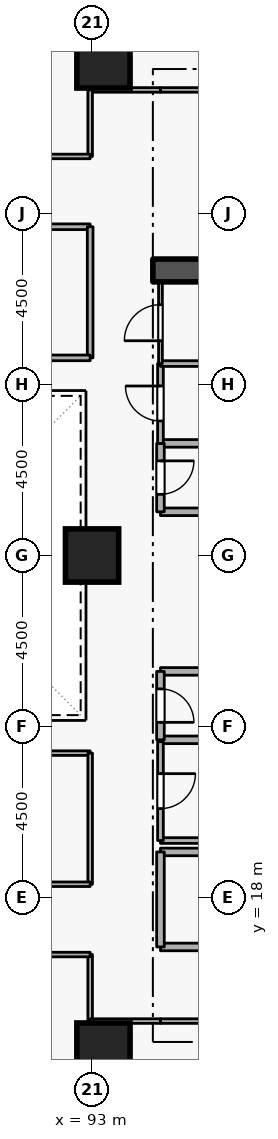
"""IFC4 building model, lengths in metres.
Left out: names, types, materials, properties, quantities, classifications, styles, units other than length and angle.
Written with IfcOpenShell. Run it as: python <this file> out.ifc"""

import sys

from ifc_helpers import new_model, si_unit, direction, frame, frame_2d, origin, origin_2d, place, context, subcontext, project, spatial, rectangle, extrude, element, fill, save


model = new_model("IFC4")
c1 = context("Model", 3, precision=1e-05, world=origin(), true_north=direction((0.0, 1.0)))
c2 = subcontext(c1, "Body", "Model", "MODEL_VIEW")
j1 = project(units=[si_unit("LENGTHUNIT", "METRE"), si_unit("PLANEANGLEUNIT", "RADIAN")], contexts=[c1])
p1 = place(None, origin())
s1 = spatial("IfcSite", under=j1, at=p1, CompositionType="ELEMENT")
p2 = place(p1, origin())
s2 = spatial("IfcBuilding", under=s1, at=p2, CompositionType="ELEMENT")
p3 = place(p2, frame((0.0, 0.0, 64.5)))
s3 = spatial("IfcBuildingStorey", under=s2, at=p3, CompositionType="ELEMENT", Elevation=64.5)
p4 = place(p3, frame((94.6, 34.5, 0.0), z_axis=(0.0, 0.0, 1.0), x_axis=(1.0, 0.0, 0.0)))
e1 = element("IfcWall", 1, at=p4, inside=s3, PredefinedType="SHEAR", context=c2, shape_type="SweptSolid", body=[
    extrude(rectangle(XDim=5.7, YDim=0.6, at=frame_2d((2.85, 0.0))), origin(), (0.0, 0.0, 1.0), 3.6),
])
for number, where, z_axis, x_axis in (
    (2, (93.3, 14.0, 0.0), (0.0, 0.0, 1.0), (1.0, 0.0, 0.0)),
    (3, (93.3, 40.0, 0.0), (0.0, 0.0, 1.0), (1.0, 0.0, 0.0)),
    (4, (93.0, 27.0, 0.0), (0.0, 0.0, 1.0), (1.0, 0.0, 0.0)),
):
    element("IfcColumn", number, at=place(p3, frame(where, z_axis=z_axis, x_axis=x_axis)), inside=s3, PredefinedType="COLUMN", context=c2, shape_type="SweptSolid", body=[
        extrude(rectangle(XDim=1.4, YDim=1.4, at=origin_2d()), origin(), (0.0, 0.0, 1.0), 3.6),
    ])
p5 = place(p3, frame((94.8, 16.7, 0.0), z_axis=(0.0, 0.0, 1.0), x_axis=(1.0, 0.0, 0.0)))
e5 = element("IfcWall", 5, at=p5, inside=s3, PredefinedType="STANDARD", context=c2, shape_type="SweptSolid", body=[
    extrude(rectangle(XDim=5.7, YDim=0.2, at=frame_2d((2.85, 0.0))), origin(), (0.0, 0.0, 1.0), 3.34),
])
p6 = place(p5, frame((2.275, 0.0, 0.0)))
e6 = element("IfcOpeningElement", 6, at=p6, cuts=e5, PredefinedType="OPENING", context=c2, shape_type="SweptSolid", body=[
    extrude(rectangle(XDim=1.15, YDim=2.1, at=frame_2d((0.575, 1.05))), frame((0.0, 0.11, 0.0), z_axis=(0.0, -1.0, 0.0), x_axis=(1.0, 0.0, 0.0)), (0.0, 0.0, 1.0), 0.22),
])
p7 = place(p3, frame((97.1, 19.2, 0.0), z_axis=(0.0, 0.0, 1.0), x_axis=(-1.0, 0.0, 0.0)))
e7 = element("IfcWall", 7, at=p7, inside=s3, PredefinedType="STANDARD", context=c2, shape_type="SweptSolid", body=[
    extrude(rectangle(XDim=2.3, YDim=0.2, at=frame_2d((1.15, 0.0))), origin(), (0.0, 0.0, 1.0), 2.545),
])
p8 = place(p3, frame((94.8, 19.2, 0.0), z_axis=(0.0, 0.0, 1.0), x_axis=(0.0, -1.0, 0.0)))
e8 = element("IfcWall", 8, at=p8, inside=s3, PredefinedType="STANDARD", context=c2, shape_type="SweptSolid", body=[
    extrude(rectangle(XDim=2.5, YDim=0.2, at=frame_2d((1.25, 0.0))), origin(), (0.0, 0.0, 1.0), 3.34),
])
for number, where, z_axis, x_axis in (
    (9, (94.8, 28.15, 0.0), (0.0, 0.0, 1.0), (1.0, 0.0, 0.0)),
    (10, (96.85, 29.95, 0.0), (0.0, 0.0, 1.0), (-1.0, 0.0, 0.0)),
):
    element("IfcWall", number, at=place(p3, frame(where, z_axis=z_axis, x_axis=x_axis)), inside=s3, PredefinedType="STANDARD", context=c2, shape_type="SweptSolid", body=[
        extrude(rectangle(XDim=2.05, YDim=0.2, at=frame_2d((1.025, 0.0))), origin(), (0.0, 0.0, 1.0), 3.34),
    ])
p9 = place(p3, frame((94.8, 29.95, 0.0), z_axis=(0.0, 0.0, 1.0), x_axis=(0.0, -1.0, 0.0)))
e11 = element("IfcWall", 11, at=p9, inside=s3, PredefinedType="STANDARD", context=c2, shape_type="SweptSolid", body=[
    extrude(rectangle(XDim=1.8, YDim=0.2, at=frame_2d((0.9, 0.0))), origin(), (0.0, 0.0, 1.0), 3.34),
])
p10 = place(p9, frame((0.46, 0.0, 0.0)))
e12 = element("IfcOpeningElement", 12, at=p10, cuts=e11, PredefinedType="OPENING", context=c2, shape_type="SweptSolid", body=[
    extrude(rectangle(XDim=0.88, YDim=2.04, at=frame_2d((0.44, 1.02))), frame((0.0, 0.11, 0.0), z_axis=(0.0, -1.0, 0.0), x_axis=(1.0, 0.0, 0.0)), (0.0, 0.0, 1.0), 0.22),
])
for number, where, z_axis, x_axis in (
    (13, (94.8, 22.15, 0.0), (0.0, 0.0, 1.0), (1.0, 0.0, 0.0)),
    (14, (96.85, 23.95, 0.0), (0.0, 0.0, 1.0), (-1.0, 0.0, 0.0)),
):
    element("IfcWall", number, at=place(p3, frame(where, z_axis=z_axis, x_axis=x_axis)), inside=s3, PredefinedType="STANDARD", context=c2, shape_type="SweptSolid", body=[
        extrude(rectangle(XDim=2.05, YDim=0.2, at=frame_2d((1.025, 0.0))), origin(), (0.0, 0.0, 1.0), 3.34),
    ])
p11 = place(p3, frame((94.8, 23.95, 0.0), z_axis=(0.0, 0.0, 1.0), x_axis=(0.0, -1.0, 0.0)))
e15 = element("IfcWall", 15, at=p11, inside=s3, PredefinedType="STANDARD", context=c2, shape_type="SweptSolid", body=[
    extrude(rectangle(XDim=1.8, YDim=0.2, at=frame_2d((0.9, 0.0))), origin(), (0.0, 0.0, 1.0), 3.34),
])
p12 = place(p11, frame((0.46, 0.0, 0.0)))
e16 = element("IfcOpeningElement", 16, at=p12, cuts=e15, PredefinedType="OPENING", context=c2, shape_type="SweptSolid", body=[
    extrude(rectangle(XDim=0.88, YDim=2.04, at=frame_2d((0.44, 1.02))), frame((0.0, 0.11, 0.0), z_axis=(0.0, -1.0, 0.0), x_axis=(1.0, 0.0, 0.0)), (0.0, 0.0, 1.0), 0.22),
])
p13 = place(p3, frame((94.8, 19.5, 0.0), z_axis=(0.0, 0.0, 1.0), x_axis=(1.0, 0.0, 0.0)))
e17 = element("IfcWall", 17, at=p13, inside=s3, PredefinedType="PARTITIONING", context=c2, shape_type="SweptSolid", body=[
    extrude(rectangle(XDim=2.05, YDim=0.15, at=frame_2d((1.025, 0.0))), origin(), (0.0, 0.0, 1.0), 2.545),
])
p14 = place(p3, frame((94.8, 22.1, 0.0), z_axis=(0.0, 0.0, 1.0), x_axis=(0.0, -1.0, 0.0)))
e18 = element("IfcWall", 18, at=p14, inside=s3, PredefinedType="PARTITIONING", context=c2, shape_type="SweptSolid", body=[
    extrude(rectangle(XDim=2.6, YDim=0.15, at=frame_2d((1.3, 0.0))), origin(), (0.0, 0.0, 1.0), 3.34),
])
p15 = place(p14, frame((0.84, 0.0, 0.0)))
e19 = element("IfcOpeningElement", 19, at=p15, cuts=e18, PredefinedType="OPENING", context=c2, shape_type="SweptSolid", body=[
    extrude(rectangle(XDim=0.92, YDim=2.08, at=frame_2d((0.46, 1.04))), frame((0.0, 0.085, 0.0), z_axis=(0.0, -1.0, 0.0), x_axis=(1.0, 0.0, 0.0)), (0.0, 0.0, 1.0), 0.17),
])
p16 = place(p3, frame((94.8, 29.95, 0.0), z_axis=(0.0, 0.0, 1.0), x_axis=(0.0, 1.0, 0.0)))
e20 = element("IfcWall", 20, at=p16, inside=s3, PredefinedType="PARTITIONING", context=c2, shape_type="SweptSolid", body=[
    extrude(rectangle(XDim=2.1, YDim=0.15, at=frame_2d((1.05, 0.0))), origin(), (0.0, 0.0, 1.0), 3.34),
])
p17 = place(p16, frame((0.59, 0.0, 0.0)))
e21 = element("IfcOpeningElement", 21, at=p17, cuts=e20, PredefinedType="OPENING", context=c2, shape_type="SweptSolid", body=[
    extrude(rectangle(XDim=0.92, YDim=2.08, at=frame_2d((0.46, 1.04))), frame((0.0, 0.085, 0.0), z_axis=(0.0, -1.0, 0.0), x_axis=(1.0, 0.0, 0.0)), (0.0, 0.0, 1.0), 0.17),
])
p18 = place(p3, frame((94.8, 32.05, 0.0), z_axis=(0.0, 0.0, 1.0), x_axis=(1.0, 0.0, 0.0)))
e22 = element("IfcWall", 22, at=p18, inside=s3, PredefinedType="PARTITIONING", context=c2, shape_type="SweptSolid", body=[
    extrude(rectangle(XDim=2.05, YDim=0.15, at=frame_2d((1.025, 0.0))), origin(), (0.0, 0.0, 1.0), 3.34),
])
p19 = place(p3, frame((94.8, 32.05, 0.0), z_axis=(0.0, 0.0, 1.0), x_axis=(0.0, 1.0, 0.0)))
e23 = element("IfcWall", 23, at=p19, inside=s3, PredefinedType="PARTITIONING", context=c2, shape_type="SweptSolid", body=[
    extrude(rectangle(XDim=2.15, YDim=0.1, at=frame_2d((1.075, 0.0))), origin(), (0.0, 0.0, 1.0), 3.34),
])
p20 = place(p19, frame((0.6, 0.0, 0.0)))
e24 = element("IfcOpeningElement", 24, at=p20, cuts=e23, PredefinedType="OPENING", context=c2, shape_type="SweptSolid", body=[
    extrude(rectangle(XDim=0.95, YDim=2.1, at=frame_2d((0.475, 1.05))), frame((0.0, 0.06, 0.0), z_axis=(0.0, -1.0, 0.0), x_axis=(1.0, 0.0, 0.0)), (0.0, 0.0, 1.0), 0.12),
])
p21 = place(p3, frame((92.95, 16.5, 0.0), z_axis=(0.0, 0.0, 1.0), x_axis=(0.0, -1.0, 0.0)))
e25 = element("IfcWall", 25, at=p21, inside=s3, PredefinedType="PARTITIONING", context=c2, shape_type="SweptSolid", body=[
    extrude(rectangle(XDim=1.75, YDim=0.12, at=frame_2d((0.875, 0.0))), origin(), (0.0, 0.0, 1.0), 3.34),
])
p22 = place(p3, frame((92.95, 14.75, 0.0), z_axis=(0.0, 0.0, 1.0), x_axis=(1.0, 0.0, 0.0)))
e26 = element("IfcWall", 26, at=p22, inside=s3, PredefinedType="PARTITIONING", context=c2, shape_type="SweptSolid", body=[
    extrude(rectangle(XDim=1.85, YDim=0.12, at=frame_2d((0.925, 0.0))), origin(), (0.0, 0.0, 1.0), 3.34),
])
p23 = place(p3, frame((94.8, 14.75, 0.0), z_axis=(0.0, 0.0, 1.0), x_axis=(1.0, 0.0, 0.0)))
e27 = element("IfcWall", 27, at=p23, inside=s3, PredefinedType="PARTITIONING", context=c2, shape_type="SweptSolid", body=[
    extrude(rectangle(XDim=9.35, YDim=0.12, at=frame_2d((4.675, 0.0))), origin(), (0.0, 0.0, 1.0), 3.34),
])
p24 = place(p23, frame((4.15, 0.0, 0.0)))
e28 = element("IfcOpeningElement", 28, at=p24, cuts=e27, PredefinedType="OPENING", context=c2, shape_type="SweptSolid", body=[
    extrude(rectangle(XDim=1.05, YDim=2.1, at=frame_2d((0.525, 1.05))), frame((0.0, 0.07, 0.0), z_axis=(0.0, -1.0, 0.0), x_axis=(1.0, 0.0, 0.0)), (0.0, 0.0, 1.0), 0.14),
])
p25 = place(p3, frame((88.5, 16.5, 0.0), z_axis=(0.0, 0.0, 1.0), x_axis=(1.0, 0.0, 0.0)))
e29 = element("IfcWall", 29, at=p25, inside=s3, PredefinedType="PARTITIONING", context=c2, shape_type="SweptSolid", body=[
    extrude(rectangle(XDim=4.45, YDim=0.12, at=frame_2d((2.225, 0.0))), origin(), (0.0, 0.0, 1.0), 3.34),
])
p26 = place(p3, frame((97.95, 39.25, 0.0), z_axis=(0.0, 0.0, 1.0), x_axis=(-1.0, 0.0, 0.0)))
e30 = element("IfcWall", 30, at=p26, inside=s3, PredefinedType="PARTITIONING", context=c2, shape_type="SweptSolid", body=[
    extrude(rectangle(XDim=3.15, YDim=0.12, at=frame_2d((1.575, 0.0))), origin(), (0.0, 0.0, 1.0), 3.34),
])
p27 = place(p3, frame((94.8, 39.25, 0.0), z_axis=(0.0, 0.0, 1.0), x_axis=(-1.0, 0.0, 0.0)))
e31 = element("IfcWall", 31, at=p27, inside=s3, PredefinedType="PARTITIONING", context=c2, shape_type="SweptSolid", body=[
    extrude(rectangle(XDim=1.85, YDim=0.12, at=frame_2d((0.925, 0.0))), origin(), (0.0, 0.0, 1.0), 3.34),
])
p28 = place(p3, frame((92.95, 39.25, 0.0), z_axis=(0.0, 0.0, 1.0), x_axis=(0.0, -1.0, 0.0)))
e32 = element("IfcWall", 32, at=p28, inside=s3, PredefinedType="PARTITIONING", context=c2, shape_type="SweptSolid", body=[
    extrude(rectangle(XDim=1.75, YDim=0.12, at=frame_2d((0.875, 0.0))), origin(), (0.0, 0.0, 1.0), 3.34),
])
p29 = place(p3, frame((92.95, 37.5, 0.0), z_axis=(0.0, 0.0, 1.0), x_axis=(-1.0, 0.0, 0.0)))
e33 = element("IfcWall", 33, at=p29, inside=s3, PredefinedType="PARTITIONING", context=c2, shape_type="SweptSolid", body=[
    extrude(rectangle(XDim=4.45, YDim=0.12, at=frame_2d((2.225, 0.0))), origin(), (0.0, 0.0, 1.0), 3.34),
])
p30 = place(p29, frame((1.7, 0.0, 0.0)))
e34 = element("IfcOpeningElement", 34, at=p30, cuts=e33, PredefinedType="OPENING", context=c2, shape_type="SweptSolid", body=[
    extrude(rectangle(XDim=1.05, YDim=2.1, at=frame_2d((0.525, 1.05))), frame((0.0, 0.07, 0.0), z_axis=(0.0, -1.0, 0.0), x_axis=(1.0, 0.0, 0.0)), (0.0, 0.0, 1.0), 0.14),
])
p31 = place(p3, frame((84.05, 35.65, 0.0), z_axis=(0.0, 0.0, 1.0), x_axis=(1.0, 0.0, 0.0)))
e35 = element("IfcWall", 35, at=p31, inside=s3, PredefinedType="PARTITIONING", context=c2, shape_type="SweptSolid", body=[
    extrude(rectangle(XDim=8.9, YDim=0.15, at=frame_2d((4.45, 0.0))), origin(), (0.0, 0.0, 1.0), 3.34),
])
p32 = place(p31, frame((3.8, 0.0, 0.0)))
e36 = element("IfcOpeningElement", 36, at=p32, cuts=e35, PredefinedType="OPENING", context=c2, shape_type="SweptSolid", body=[
    extrude(rectangle(XDim=1.3, YDim=2.12, at=frame_2d((0.65, 1.06))), frame((0.0, 0.085, 0.0), z_axis=(0.0, -1.0, 0.0), x_axis=(1.0, 0.0, 0.0)), (0.0, 0.0, 1.0), 0.17),
])
p33 = place(p3, frame((92.95, 35.65, 0.0), z_axis=(0.0, 0.0, 1.0), x_axis=(0.0, -1.0, 0.0)))
e37 = element("IfcWall", 37, at=p33, inside=s3, PredefinedType="PARTITIONING", context=c2, shape_type="SweptSolid", body=[
    extrude(rectangle(XDim=3.45, YDim=0.15, at=frame_2d((1.725, 0.0))), origin(), (0.0, 0.0, 1.0), 3.34),
])
p34 = place(p3, frame((92.95, 32.2, 0.0), z_axis=(0.0, 0.0, 1.0), x_axis=(-1.0, 0.0, 0.0)))
e38 = element("IfcWall", 38, at=p34, inside=s3, PredefinedType="PARTITIONING", context=c2, shape_type="SweptSolid", body=[
    extrude(rectangle(XDim=8.9, YDim=0.15, at=frame_2d((4.45, 0.0))), origin(), (0.0, 0.0, 1.0), 3.34),
])
p35 = place(p3, frame((84.05, 21.8, 0.0), z_axis=(0.0, 0.0, 1.0), x_axis=(1.0, 0.0, 0.0)))
e39 = element("IfcWall", 39, at=p35, inside=s3, PredefinedType="PARTITIONING", context=c2, shape_type="SweptSolid", body=[
    extrude(rectangle(XDim=8.9, YDim=0.12, at=frame_2d((4.45, 0.0))), origin(), (0.0, 0.0, 1.0), 3.34),
])
p36 = place(p3, frame((92.95, 21.8, 0.0), z_axis=(0.0, 0.0, 1.0), x_axis=(0.0, -1.0, 0.0)))
e40 = element("IfcWall", 40, at=p36, inside=s3, PredefinedType="PARTITIONING", context=c2, shape_type="SweptSolid", body=[
    extrude(rectangle(XDim=3.45, YDim=0.12, at=frame_2d((1.725, 0.0))), origin(), (0.0, 0.0, 1.0), 3.34),
])
p37 = place(p3, frame((92.95, 18.35, 0.0), z_axis=(0.0, 0.0, 1.0), x_axis=(-1.0, 0.0, 0.0)))
e41 = element("IfcWall", 41, at=p37, inside=s3, PredefinedType="PARTITIONING", context=c2, shape_type="SweptSolid", body=[
    extrude(rectangle(XDim=8.9, YDim=0.12, at=frame_2d((4.45, 0.0))), origin(), (0.0, 0.0, 1.0), 3.34),
])
p38 = place(p37, frame((3.975, 0.0, 0.0)))
e42 = element("IfcOpeningElement", 42, at=p38, cuts=e41, PredefinedType="OPENING", context=c2, shape_type="SweptSolid", body=[
    extrude(rectangle(XDim=0.95, YDim=2.1, at=frame_2d((0.475, 1.05))), frame((0.0, 0.07, 0.0), z_axis=(0.0, -1.0, 0.0), x_axis=(1.0, 0.0, 0.0)), (0.0, 0.0, 1.0), 0.14),
])
p39 = place(p10, origin())
e43 = element("IfcDoor", 43, at=p39, inside=s3, OperationType="SINGLE_SWING_LEFT", PredefinedType="DOOR", context=c2, shape_type="SweptSolid", body=[
    extrude(rectangle(XDim=0.88, YDim=2.04, at=frame_2d((0.44, 1.02))), frame((0.0, 0.025, 0.0), z_axis=(0.0, -1.0, 0.0), x_axis=(1.0, 0.0, 0.0)), (0.0, 0.0, 1.0), 0.05),
])
fill(e12, e43)
p40 = place(p12, origin())
e44 = element("IfcDoor", 44, at=p40, inside=s3, OperationType="SINGLE_SWING_RIGHT", PredefinedType="DOOR", context=c2, shape_type="SweptSolid", body=[
    extrude(rectangle(XDim=0.88, YDim=2.04, at=frame_2d((0.44, 1.02))), frame((0.0, 0.025, 0.0), z_axis=(0.0, -1.0, 0.0), x_axis=(1.0, 0.0, 0.0)), (0.0, 0.0, 1.0), 0.05),
])
fill(e16, e44)
p41 = place(p15, origin())
e45 = element("IfcDoor", 45, at=p41, inside=s3, OperationType="SINGLE_SWING_LEFT", PredefinedType="DOOR", context=c2, shape_type="SweptSolid", body=[
    extrude(rectangle(XDim=0.92, YDim=2.08, at=frame_2d((0.46, 1.04))), frame((0.0, 0.025, 0.0), z_axis=(0.0, -1.0, 0.0), x_axis=(1.0, 0.0, 0.0)), (0.0, 0.0, 1.0), 0.05),
])
fill(e19, e45)
p42 = place(p17, origin())
e46 = element("IfcDoor", 46, at=p42, inside=s3, OperationType="SINGLE_SWING_RIGHT", PredefinedType="DOOR", context=c2, shape_type="SweptSolid", body=[
    extrude(rectangle(XDim=0.92, YDim=2.08, at=frame_2d((0.46, 1.04))), frame((0.0, 0.025, 0.0), z_axis=(0.0, -1.0, 0.0), x_axis=(1.0, 0.0, 0.0)), (0.0, 0.0, 1.0), 0.05),
])
fill(e21, e46)
p43 = place(p20, origin())
e47 = element("IfcDoor", 47, at=p43, inside=s3, OperationType="SINGLE_SWING_LEFT", PredefinedType="DOOR", context=c2, shape_type="SweptSolid", body=[
    extrude(rectangle(XDim=0.95, YDim=2.1, at=frame_2d((0.475, 1.05))), frame((0.0, 0.025, 0.0), z_axis=(0.0, -1.0, 0.0), x_axis=(1.0, 0.0, 0.0)), (0.0, 0.0, 1.0), 0.05),
])
fill(e24, e47)
save(model, sys.argv[1])
